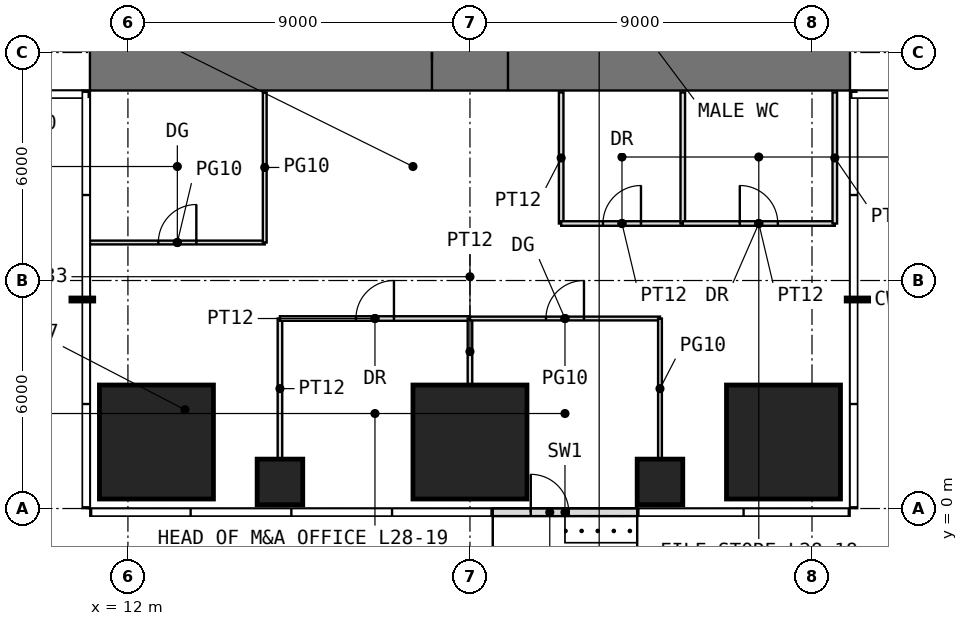
"""IFC4 building model, lengths in metres.
Left out: names, types, materials, properties, quantities, classifications, styles, units other than length and angle.
Written with IfcOpenShell. Run it as: python <this file> out.ifc"""

import sys

from ifc_helpers import new_model, si_unit, direction, frame, frame_2d, origin, origin_2d, place, context, subcontext, project, spatial, rectangle, extrude, element, fill, save


model = new_model("IFC4")
c1 = context("Model", 3, precision=1e-05, world=origin(), true_north=direction((0.0, 1.0)))
c2 = subcontext(c1, "Body", "Model", "MODEL_VIEW")
j1 = project(units=[si_unit("LENGTHUNIT", "METRE"), si_unit("PLANEANGLEUNIT", "RADIAN")], contexts=[c1])
p1 = place(None, origin())
s1 = spatial("IfcSite", under=j1, at=p1, CompositionType="ELEMENT")
p2 = place(p1, origin())
s2 = spatial("IfcBuilding", under=s1, at=p2, CompositionType="ELEMENT")
p3 = place(p2, frame((0.0, 0.0, 120.5)))
s3 = spatial("IfcBuildingStorey", under=s2, at=p3, CompositionType="ELEMENT", Elevation=120.5)
p4 = place(p3, frame((12.75, 1.75, 0.0), z_axis=(0.0, 0.0, 1.0), x_axis=(1.0, 0.0, 0.0)))
e1 = element("IfcColumn", 1, at=p4, inside=s3, PredefinedType="COLUMN", context=c2, shape_type="SweptSolid", body=[
    extrude(rectangle(XDim=3.0, YDim=3.0, at=origin_2d()), origin(), (0.0, 0.0, 1.0), 4.0),
])
p5 = place(p3, frame((16.0, 0.7, 0.0), z_axis=(0.0, 0.0, 1.0), x_axis=(1.0, 0.0, 0.0)))
e2 = element("IfcColumn", 2, at=p5, inside=s3, PredefinedType="COLUMN", context=c2, shape_type="SweptSolid", body=[
    extrude(rectangle(XDim=1.2, YDim=1.2, at=origin_2d()), origin(), (0.0, 0.0, 1.0), 4.0),
])
p6 = place(p3, frame((21.0, 1.75, 0.0), z_axis=(0.0, 0.0, 1.0), x_axis=(1.0, 0.0, 0.0)))
e3 = element("IfcColumn", 3, at=p6, inside=s3, PredefinedType="COLUMN", context=c2, shape_type="SweptSolid", body=[
    extrude(rectangle(XDim=3.0, YDim=3.0, at=origin_2d()), origin(), (0.0, 0.0, 1.0), 4.0),
])
p7 = place(p3, frame((26.0, 0.7, 0.0), z_axis=(0.0, 0.0, 1.0), x_axis=(1.0, 0.0, 0.0)))
e4 = element("IfcColumn", 4, at=p7, inside=s3, PredefinedType="COLUMN", context=c2, shape_type="SweptSolid", body=[
    extrude(rectangle(XDim=1.2, YDim=1.2, at=origin_2d()), origin(), (0.0, 0.0, 1.0), 4.0),
])
p8 = place(p3, frame((29.25, 1.75, 0.0), z_axis=(0.0, 0.0, 1.0), x_axis=(1.0, 0.0, 0.0)))
e5 = element("IfcColumn", 5, at=p8, inside=s3, PredefinedType="COLUMN", context=c2, shape_type="SweptSolid", body=[
    extrude(rectangle(XDim=3.0, YDim=3.0, at=origin_2d()), origin(), (0.0, 0.0, 1.0), 4.0),
])
p9 = place(p3, frame((21.6, -0.1, 0.0), z_axis=(0.0, 0.0, 1.0), x_axis=(1.0, 0.0, 0.0)))
e6 = element("IfcWall", 6, at=p9, inside=s3, PredefinedType="USERDEFINED", context=c2, shape_type="SweptSolid", body=[
    extrude(rectangle(XDim=3.8, YDim=0.2, at=frame_2d((1.9, 0.0))), origin(), (0.0, 0.0, 1.0), 3.75),
])
p10 = place(p9, frame((1.0, 0.0, 0.0)))
e7 = element("IfcOpeningElement", 7, at=p10, cuts=e6, PredefinedType="OPENING", context=c2, shape_type="SweptSolid", body=[
    extrude(rectangle(XDim=1.0, YDim=2.4, at=frame_2d((0.5, 1.2))), frame((0.0, 0.11, 0.0), z_axis=(0.0, -1.0, 0.0), x_axis=(1.0, 0.0, 0.0)), (0.0, 0.0, 1.0), 0.22),
])
p11 = place(p3, frame((11.0, 11.8, -0.05), z_axis=(0.0, 0.0, 1.0), x_axis=(1.0, 0.0, 0.0)))
e8 = element("IfcWall", 8, at=p11, inside=s3, PredefinedType="SHEAR", context=c2, shape_type="SweptSolid", body=[
    extrude(rectangle(XDim=20.0, YDim=1.6, at=frame_2d((10.0, 0.0))), origin(), (0.0, 0.0, 1.0), 4.0),
])
p12 = place(p11, frame((9.0, 0.0, 0.05)))
e9 = element("IfcOpeningElement", 9, at=p12, cuts=e8, PredefinedType="OPENING", context=c2, shape_type="SweptSolid", body=[
    extrude(rectangle(XDim=2.0, YDim=2.2, at=frame_2d((1.0, 1.1))), frame((0.0, 0.81, 0.0), z_axis=(0.0, -1.0, 0.0), x_axis=(1.0, 0.0, 0.0)), (0.0, 0.0, 1.0), 1.62),
])
p13 = place(p3, frame((11.0, 7.0, 0.0), z_axis=(0.0, 0.0, 1.0), x_axis=(1.0, 0.0, 0.0)))
e10 = element("IfcWall", 10, at=p13, inside=s3, PredefinedType="PARTITIONING", context=c2, shape_type="SweptSolid", body=[
    extrude(rectangle(XDim=4.6, YDim=0.1, at=frame_2d((2.3, 0.0))), origin(), (0.0, 0.0, 1.0), 3.75),
])
p14 = place(p13, frame((1.8, 0.0, 0.0)))
e11 = element("IfcOpeningElement", 11, at=p14, cuts=e10, PredefinedType="OPENING", context=c2, shape_type="SweptSolid", body=[
    extrude(rectangle(XDim=1.0, YDim=2.4, at=frame_2d((0.5, 1.2))), frame((0.0, 0.06, 0.0), z_axis=(0.0, -1.0, 0.0), x_axis=(1.0, 0.0, 0.0)), (0.0, 0.0, 1.0), 0.12),
])
p15 = place(p3, frame((15.6, 7.0, 0.0), z_axis=(0.0, 0.0, 1.0), x_axis=(0.0, 1.0, 0.0)))
e12 = element("IfcWall", 12, at=p15, inside=s3, PredefinedType="PARTITIONING", context=c2, shape_type="SweptSolid", body=[
    extrude(rectangle(XDim=3.95, YDim=0.1, at=frame_2d((1.975, 0.0))), origin(), (0.0, 0.0, 1.0), 3.75),
])
p16 = place(p3, frame((16.0, 1.31, 0.0), z_axis=(0.0, 0.0, 1.0), x_axis=(0.0, 1.0, 0.0)))
e13 = element("IfcWall", 13, at=p16, inside=s3, PredefinedType="PARTITIONING", context=c2, shape_type="SweptSolid", body=[
    extrude(rectangle(XDim=3.69, YDim=0.12, at=frame_2d((1.845, 0.0))), origin(), (0.0, 0.0, 1.0), 3.75),
])
p17 = place(p3, frame((16.0, 5.0, 0.0), z_axis=(0.0, 0.0, 1.0), x_axis=(1.0, 0.0, 0.0)))
e14 = element("IfcWall", 14, at=p17, inside=s3, PredefinedType="PARTITIONING", context=c2, shape_type="SweptSolid", body=[
    extrude(rectangle(XDim=5.0, YDim=0.12, at=frame_2d((2.5, 0.0))), origin(), (0.0, 0.0, 1.0), 3.75),
])
p18 = place(p17, frame((2.0, 0.0, 0.0)))
e15 = element("IfcOpeningElement", 15, at=p18, cuts=e14, PredefinedType="OPENING", context=c2, shape_type="SweptSolid", body=[
    extrude(rectangle(XDim=1.0, YDim=2.2, at=frame_2d((0.5, 1.1))), frame((0.0, 0.07, 0.0), z_axis=(0.0, -1.0, 0.0), x_axis=(1.0, 0.0, 0.0)), (0.0, 0.0, 1.0), 0.14),
])
p19 = place(p3, frame((21.0, 3.26, 0.0), z_axis=(0.0, 0.0, 1.0), x_axis=(0.0, 1.0, 0.0)))
e16 = element("IfcWall", 16, at=p19, inside=s3, PredefinedType="PARTITIONING", context=c2, shape_type="SweptSolid", body=[
    extrude(rectangle(XDim=1.74, YDim=0.12, at=frame_2d((0.87, 0.0))), origin(), (0.0, 0.0, 1.0), 3.75),
])
p20 = place(p3, frame((21.0, 5.0, 0.0), z_axis=(0.0, 0.0, 1.0), x_axis=(1.0, 0.0, 0.0)))
e17 = element("IfcWall", 17, at=p20, inside=s3, PredefinedType="PARTITIONING", context=c2, shape_type="SweptSolid", body=[
    extrude(rectangle(XDim=5.0, YDim=0.1, at=frame_2d((2.5, 0.0))), origin(), (0.0, 0.0, 1.0), 3.75),
])
p21 = place(p20, frame((2.0, 0.0, 0.0)))
e18 = element("IfcOpeningElement", 18, at=p21, cuts=e17, PredefinedType="OPENING", context=c2, shape_type="SweptSolid", body=[
    extrude(rectangle(XDim=1.0, YDim=2.4, at=frame_2d((0.5, 1.2))), frame((0.0, 0.06, 0.0), z_axis=(0.0, -1.0, 0.0), x_axis=(1.0, 0.0, 0.0)), (0.0, 0.0, 1.0), 0.12),
])
p22 = place(p3, frame((23.4, 7.5, 0.0), z_axis=(0.0, 0.0, 1.0), x_axis=(0.0, 1.0, 0.0)))
e19 = element("IfcWall", 19, at=p22, inside=s3, PredefinedType="PARTITIONING", context=c2, shape_type="SweptSolid", body=[
    extrude(rectangle(XDim=3.45, YDim=0.12, at=frame_2d((1.725, 0.0))), origin(), (0.0, 0.0, 1.0), 3.75),
])
p23 = place(p3, frame((23.4, 7.5, 0.0), z_axis=(0.0, 0.0, 1.0), x_axis=(1.0, 0.0, 0.0)))
e20 = element("IfcWall", 20, at=p23, inside=s3, PredefinedType="PARTITIONING", context=c2, shape_type="SweptSolid", body=[
    extrude(rectangle(XDim=3.2, YDim=0.12, at=frame_2d((1.6, 0.0))), origin(), (0.0, 0.0, 1.0), 3.75),
])
p24 = place(p23, frame((1.1, 0.0, 0.0)))
e21 = element("IfcOpeningElement", 21, at=p24, cuts=e20, PredefinedType="OPENING", context=c2, shape_type="SweptSolid", body=[
    extrude(rectangle(XDim=1.0, YDim=2.2, at=frame_2d((0.5, 1.1))), frame((0.0, 0.07, 0.0), z_axis=(0.0, -1.0, 0.0), x_axis=(1.0, 0.0, 0.0)), (0.0, 0.0, 1.0), 0.14),
])
p25 = place(p3, frame((26.0, 1.31, 0.0), z_axis=(0.0, 0.0, 1.0), x_axis=(0.0, 1.0, 0.0)))
e22 = element("IfcWall", 22, at=p25, inside=s3, PredefinedType="PARTITIONING", context=c2, shape_type="SweptSolid", body=[
    extrude(rectangle(XDim=3.69, YDim=0.1, at=frame_2d((1.845, 0.0))), origin(), (0.0, 0.0, 1.0), 3.75),
])
p26 = place(p3, frame((26.6, 7.5, 0.0), z_axis=(0.0, 0.0, 1.0), x_axis=(0.0, 1.0, 0.0)))
e23 = element("IfcWall", 23, at=p26, inside=s3, PredefinedType="PARTITIONING", context=c2, shape_type="SweptSolid", body=[
    extrude(rectangle(XDim=3.45, YDim=0.12, at=frame_2d((1.725, 0.0))), origin(), (0.0, 0.0, 1.0), 3.75),
])
p27 = place(p3, frame((26.6, 7.5, 0.0), z_axis=(0.0, 0.0, 1.0), x_axis=(1.0, 0.0, 0.0)))
e24 = element("IfcWall", 24, at=p27, inside=s3, PredefinedType="PARTITIONING", context=c2, shape_type="SweptSolid", body=[
    extrude(rectangle(XDim=4.0, YDim=0.12, at=frame_2d((2.0, 0.0))), origin(), (0.0, 0.0, 1.0), 3.75),
])
p28 = place(p27, frame((1.5, 0.0, 0.0)))
e25 = element("IfcOpeningElement", 25, at=p28, cuts=e24, PredefinedType="OPENING", context=c2, shape_type="SweptSolid", body=[
    extrude(rectangle(XDim=1.0, YDim=2.2, at=frame_2d((0.5, 1.1))), frame((0.0, 0.07, 0.0), z_axis=(0.0, -1.0, 0.0), x_axis=(1.0, 0.0, 0.0)), (0.0, 0.0, 1.0), 0.14),
])
p29 = place(p3, frame((30.6, 7.5, 0.0), z_axis=(0.0, 0.0, 1.0), x_axis=(0.0, 1.0, 0.0)))
e26 = element("IfcWall", 26, at=p29, inside=s3, PredefinedType="PARTITIONING", context=c2, shape_type="SweptSolid", body=[
    extrude(rectangle(XDim=3.45, YDim=0.12, at=frame_2d((1.725, 0.0))), origin(), (0.0, 0.0, 1.0), 3.75),
])
p30 = place(p10, origin())
e27 = element("IfcDoor", 27, at=p30, inside=s3, OperationType="SINGLE_SWING_LEFT", PredefinedType="DOOR", context=c2, shape_type="SweptSolid", body=[
    extrude(rectangle(XDim=1.0, YDim=2.4, at=frame_2d((0.5, 1.2))), frame((0.0, 0.025, 0.0), z_axis=(0.0, -1.0, 0.0), x_axis=(1.0, 0.0, 0.0)), (0.0, 0.0, 1.0), 0.05),
])
fill(e7, e27)
p31 = place(p12, origin())
e28 = element("IfcDoor", 28, at=p31, inside=s3, OperationType="DOUBLE_DOOR_SINGLE_SWING", PredefinedType="DOOR", context=c2, shape_type="SweptSolid", body=[
    extrude(rectangle(XDim=2.0, YDim=2.2, at=frame_2d((1.0, 1.1))), frame((0.0, 0.025, 0.0), z_axis=(0.0, -1.0, 0.0), x_axis=(1.0, 0.0, 0.0)), (0.0, 0.0, 1.0), 0.05),
])
fill(e9, e28)
p32 = place(p14, origin())
e29 = element("IfcDoor", 29, at=p32, inside=s3, OperationType="SINGLE_SWING_RIGHT", PredefinedType="DOOR", context=c2, shape_type="SweptSolid", body=[
    extrude(rectangle(XDim=1.0, YDim=2.4, at=frame_2d((0.5, 1.2))), frame((0.0, 0.025, 0.0), z_axis=(0.0, -1.0, 0.0), x_axis=(1.0, 0.0, 0.0)), (0.0, 0.0, 1.0), 0.05),
])
fill(e11, e29)
p33 = place(p24, origin())
e30 = element("IfcDoor", 30, at=p33, inside=s3, OperationType="SINGLE_SWING_RIGHT", PredefinedType="DOOR", context=c2, shape_type="SweptSolid", body=[
    extrude(rectangle(XDim=1.0, YDim=2.2, at=frame_2d((0.5, 1.1))), frame((0.0, 0.025, 0.0), z_axis=(0.0, -1.0, 0.0), x_axis=(1.0, 0.0, 0.0)), (0.0, 0.0, 1.0), 0.05),
])
fill(e21, e30)
p34 = place(p28, origin())
e31 = element("IfcDoor", 31, at=p34, inside=s3, OperationType="SINGLE_SWING_LEFT", PredefinedType="DOOR", context=c2, shape_type="SweptSolid", body=[
    extrude(rectangle(XDim=1.0, YDim=2.2, at=frame_2d((0.5, 1.1))), frame((0.0, 0.025, 0.0), z_axis=(0.0, -1.0, 0.0), x_axis=(1.0, 0.0, 0.0)), (0.0, 0.0, 1.0), 0.05),
])
fill(e25, e31)
p35 = place(p18, origin())
e32 = element("IfcDoor", 32, at=p35, inside=s3, OperationType="SINGLE_SWING_RIGHT", PredefinedType="DOOR", context=c2, shape_type="SweptSolid", body=[
    extrude(rectangle(XDim=1.0, YDim=2.2, at=frame_2d((0.5, 1.1))), frame((0.0, 0.025, 0.0), z_axis=(0.0, -1.0, 0.0), x_axis=(1.0, 0.0, 0.0)), (0.0, 0.0, 1.0), 0.05),
])
fill(e15, e32)
p36 = place(p21, origin())
e33 = element("IfcDoor", 33, at=p36, inside=s3, OperationType="SINGLE_SWING_RIGHT", PredefinedType="DOOR", context=c2, shape_type="SweptSolid", body=[
    extrude(rectangle(XDim=1.0, YDim=2.4, at=frame_2d((0.5, 1.2))), frame((0.0, 0.025, 0.0), z_axis=(0.0, -1.0, 0.0), x_axis=(1.0, 0.0, 0.0)), (0.0, 0.0, 1.0), 0.05),
])
fill(e18, e33)
save(model, sys.argv[1])
